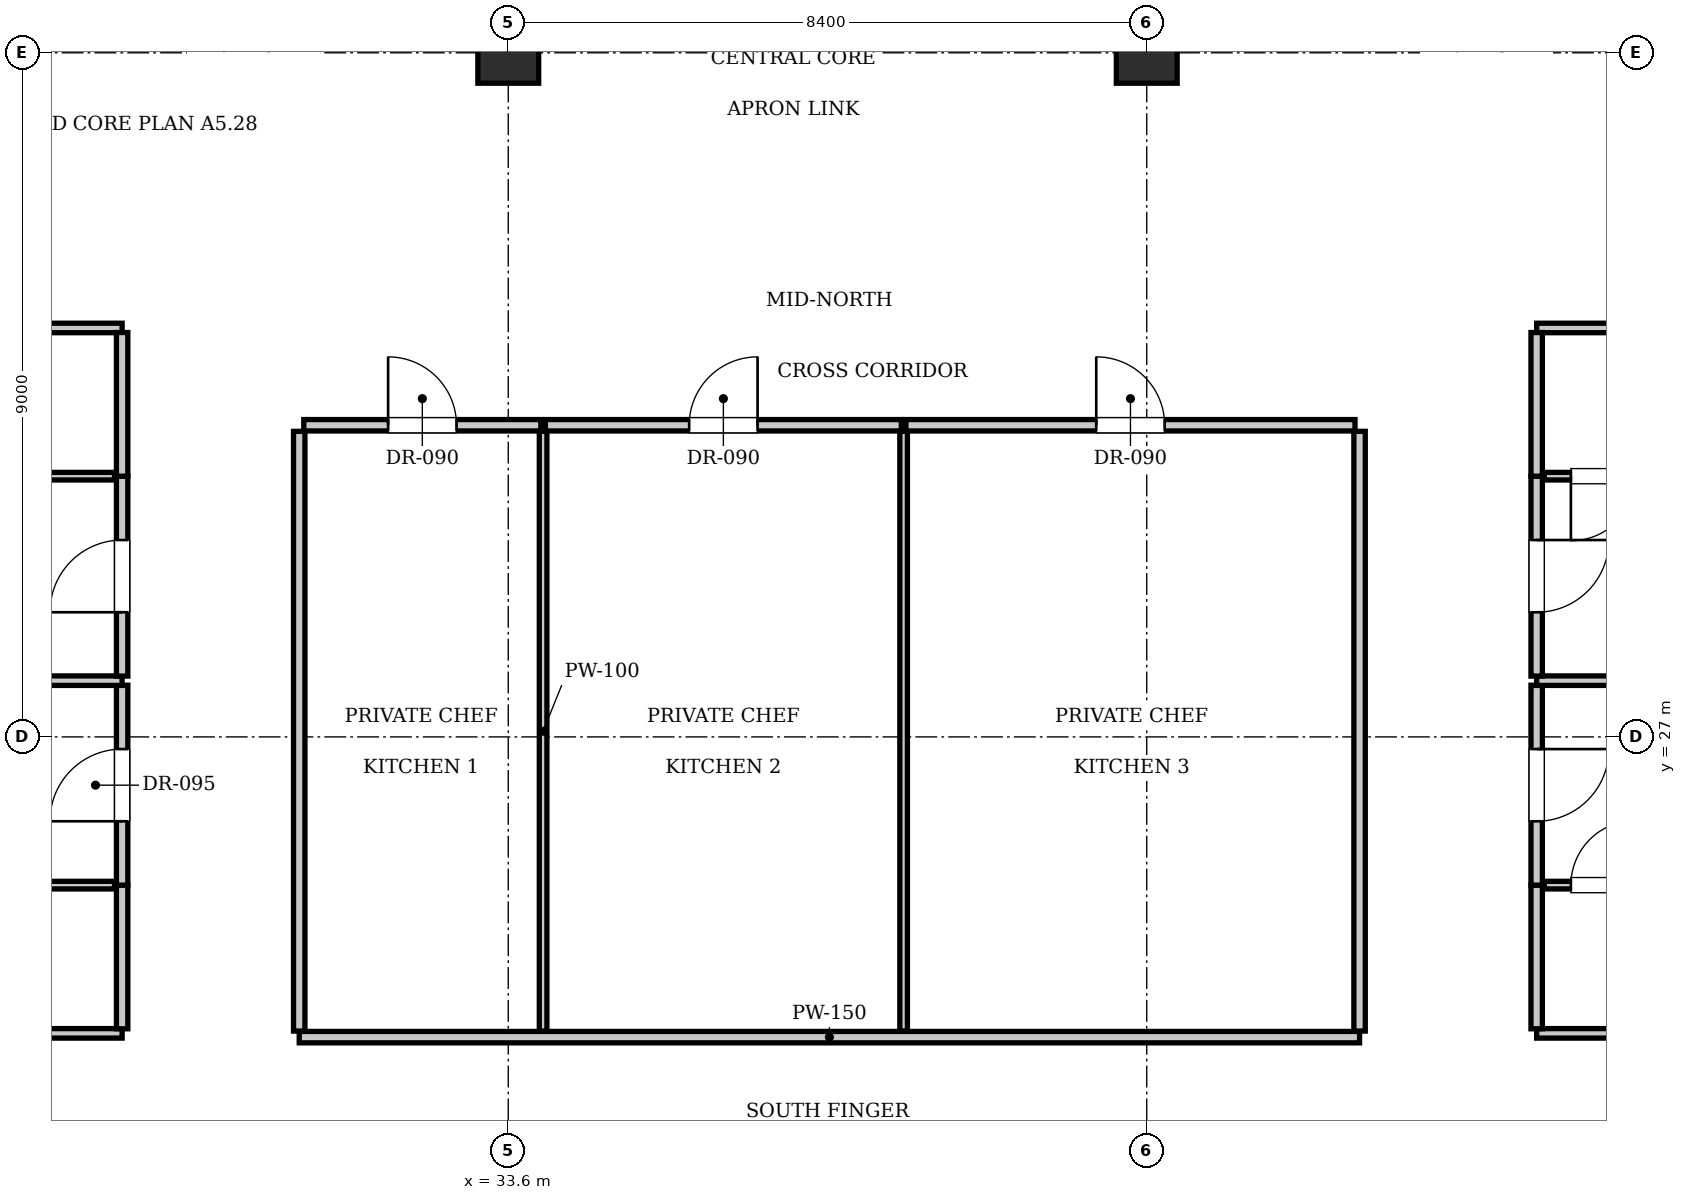
"""IFC4 building model, lengths in metres.
Left out: names, types, materials, properties, quantities, classifications, styles, units other than length and angle.
Written with IfcOpenShell. Run it as: python <this file> out.ifc"""

import sys

from ifc_helpers import new_model, si_unit, direction, frame, frame_2d, origin, origin_2d, place, context, subcontext, project, spatial, rectangle, extrude, element, fill, save


model = new_model("IFC4")
c1 = context("Model", 3, precision=1e-05, world=origin(), true_north=direction((0.0, 1.0)))
c2 = subcontext(c1, "Body", "Model", "MODEL_VIEW")
j1 = project(units=[si_unit("LENGTHUNIT", "METRE"), si_unit("PLANEANGLEUNIT", "RADIAN")], contexts=[c1])
p1 = place(None, origin())
s1 = spatial("IfcSite", under=j1, at=p1, CompositionType="ELEMENT")
p2 = place(p1, origin())
s2 = spatial("IfcBuilding", under=s1, at=p2, CompositionType="ELEMENT")
p3 = place(p2, frame((0.0, 0.0, 281.75)))
s3 = spatial("IfcBuildingStorey", under=s2, at=p3, CompositionType="ELEMENT", Elevation=281.75)
for number, where, z_axis, x_axis in (
    (1, (33.6, 36.0, 0.0), (0.0, 0.0, 1.0), (1.0, 0.0, 0.0)),
    (2, (42.0, 36.0, 0.0), (0.0, 0.0, 1.0), (1.0, 0.0, 0.0)),
):
    element("IfcColumn", number, at=place(p3, frame(where, z_axis=z_axis, x_axis=x_axis)), inside=s3, PredefinedType="COLUMN", context=c2, shape_type="SweptSolid", body=[
        extrude(rectangle(XDim=0.8, YDim=0.8, at=origin_2d()), origin(), (0.0, 0.0, 1.0), 3.85),
    ])
p4 = place(p3, frame((30.85, 23.05, 0.0), z_axis=(0.0, 0.0, 1.0), x_axis=(1.0, 0.0, 0.0)))
e3 = element("IfcWall", 3, at=p4, inside=s3, PredefinedType="PARTITIONING", context=c2, shape_type="SweptSolid", body=[
    extrude(rectangle(XDim=13.95, YDim=0.15, at=frame_2d((6.975, 0.0))), origin(), (0.0, 0.0, 1.0), 3.61),
])
for number, where, z_axis, x_axis in (
    (4, (30.85, 23.13, 0.0), (0.0, 0.0, 1.0), (0.0, 1.0, 0.0)),
    (5, (44.8, 23.13, 0.0), (0.0, 0.0, 1.0), (0.0, 1.0, 0.0)),
):
    element("IfcWall", number, at=place(p3, frame(where, z_axis=z_axis, x_axis=x_axis)), inside=s3, PredefinedType="PARTITIONING", context=c2, shape_type="SweptSolid", body=[
        extrude(rectangle(XDim=7.89, YDim=0.15, at=frame_2d((3.945, 0.0))), origin(), (0.0, 0.0, 1.0), 3.61),
    ])
p5 = place(p3, frame((30.91, 31.1, 0.0), z_axis=(0.0, 0.0, 1.0), x_axis=(1.0, 0.0, 0.0)))
e6 = element("IfcWall", 6, at=p5, inside=s3, PredefinedType="PARTITIONING", context=c2, shape_type="SweptSolid", body=[
    extrude(rectangle(XDim=3.119, YDim=0.15, at=frame_2d((1.559, 0.0))), origin(), (0.0, 0.0, 1.0), 3.61),
])
p6 = place(p5, frame((1.109, 0.0, 0.0)))
e7 = element("IfcOpeningElement", 7, at=p6, cuts=e6, PredefinedType="OPENING", context=c2, shape_type="SweptSolid", body=[
    extrude(rectangle(XDim=0.9, YDim=2.1, at=frame_2d((0.45, 1.05))), frame((0.0, 0.085, 0.0), z_axis=(0.0, -1.0, 0.0), x_axis=(1.0, 0.0, 0.0)), (0.0, 0.0, 1.0), 0.17),
])
p7 = place(p3, frame((34.059, 23.13, 0.0), z_axis=(0.0, 0.0, 1.0), x_axis=(0.0, 1.0, 0.0)))
e8 = element("IfcWall", 8, at=p7, inside=s3, PredefinedType="PARTITIONING", context=c2, shape_type="SweptSolid", body=[
    extrude(rectangle(XDim=7.89, YDim=0.1, at=frame_2d((3.945, 0.0))), origin(), (0.0, 0.0, 1.0), 3.61),
])
p8 = place(p3, frame((34.088, 31.1, 0.0), z_axis=(0.0, 0.0, 1.0), x_axis=(1.0, 0.0, 0.0)))
e9 = element("IfcWall", 9, at=p8, inside=s3, PredefinedType="PARTITIONING", context=c2, shape_type="SweptSolid", body=[
    extrude(rectangle(XDim=4.683, YDim=0.15, at=frame_2d((2.342, 0.0))), origin(), (0.0, 0.0, 1.0), 3.61),
])
p9 = place(p8, frame((1.892, 0.0, 0.0)))
e10 = element("IfcOpeningElement", 10, at=p9, cuts=e9, PredefinedType="OPENING", context=c2, shape_type="SweptSolid", body=[
    extrude(rectangle(XDim=0.9, YDim=2.1, at=frame_2d((0.45, 1.05))), frame((0.0, 0.085, 0.0), z_axis=(0.0, -1.0, 0.0), x_axis=(1.0, 0.0, 0.0)), (0.0, 0.0, 1.0), 0.17),
])
p10 = place(p3, frame((38.802, 23.13, 0.0), z_axis=(0.0, 0.0, 1.0), x_axis=(0.0, 1.0, 0.0)))
e11 = element("IfcWall", 11, at=p10, inside=s3, PredefinedType="PARTITIONING", context=c2, shape_type="SweptSolid", body=[
    extrude(rectangle(XDim=7.89, YDim=0.1, at=frame_2d((3.945, 0.0))), origin(), (0.0, 0.0, 1.0), 3.61),
])
p11 = place(p3, frame((38.832, 31.1, 0.0), z_axis=(0.0, 0.0, 1.0), x_axis=(1.0, 0.0, 0.0)))
e12 = element("IfcWall", 12, at=p11, inside=s3, PredefinedType="PARTITIONING", context=c2, shape_type="SweptSolid", body=[
    extrude(rectangle(XDim=5.908, YDim=0.15, at=frame_2d((2.954, 0.0))), origin(), (0.0, 0.0, 1.0), 3.61),
])
p12 = place(p11, frame((2.504, 0.0, 0.0)))
e13 = element("IfcOpeningElement", 13, at=p12, cuts=e12, PredefinedType="OPENING", context=c2, shape_type="SweptSolid", body=[
    extrude(rectangle(XDim=0.9, YDim=2.1, at=frame_2d((0.45, 1.05))), frame((0.0, 0.085, 0.0), z_axis=(0.0, -1.0, 0.0), x_axis=(1.0, 0.0, 0.0)), (0.0, 0.0, 1.0), 0.17),
])
p13 = place(p3, frame((15.5, 23.1, 0.0), z_axis=(0.0, 0.0, 1.0), x_axis=(1.0, 0.0, 0.0)))
e14 = element("IfcWall", 14, at=p13, inside=s3, PredefinedType="PARTITIONING", context=c2, shape_type="SweptSolid", body=[
    extrude(rectangle(XDim=13.02, YDim=0.125, at=frame_2d((6.51, 0.0))), origin(), (0.0, 0.0, 1.0), 3.61),
])
p14 = place(p3, frame((47.13, 23.1, 0.0), z_axis=(0.0, 0.0, 1.0), x_axis=(1.0, 0.0, 0.0)))
e15 = element("IfcWall", 15, at=p14, inside=s3, PredefinedType="PARTITIONING", context=c2, shape_type="SweptSolid", body=[
    extrude(rectangle(XDim=12.97, YDim=0.125, at=frame_2d((6.485, 0.0))), origin(), (0.0, 0.0, 1.0), 3.61),
])
p15 = place(p3, frame((15.5, 32.38, 0.0), z_axis=(0.0, 0.0, 1.0), x_axis=(1.0, 0.0, 0.0)))
e16 = element("IfcWall", 16, at=p15, inside=s3, PredefinedType="PARTITIONING", context=c2, shape_type="SweptSolid", body=[
    extrude(rectangle(XDim=13.02, YDim=0.125, at=frame_2d((6.51, 0.0))), origin(), (0.0, 0.0, 1.0), 3.61),
])
p16 = place(p3, frame((47.13, 32.38, 0.0), z_axis=(0.0, 0.0, 1.0), x_axis=(1.0, 0.0, 0.0)))
e17 = element("IfcWall", 17, at=p16, inside=s3, PredefinedType="PARTITIONING", context=c2, shape_type="SweptSolid", body=[
    extrude(rectangle(XDim=12.97, YDim=0.125, at=frame_2d((6.485, 0.0))), origin(), (0.0, 0.0, 1.0), 3.61),
])
p17 = place(p3, frame((28.52, 23.16, 0.0), z_axis=(0.0, 0.0, 1.0), x_axis=(0.0, 1.0, 0.0)))
e18 = element("IfcWall", 18, at=p17, inside=s3, PredefinedType="PARTITIONING", context=c2, shape_type="SweptSolid", body=[
    extrude(rectangle(XDim=1.89, YDim=0.15, at=frame_2d((0.945, 0.0))), origin(), (0.0, 0.0, 1.0), 3.61),
])
p18 = place(p3, frame((28.52, 25.05, 0.0), z_axis=(0.0, 0.0, 1.0), x_axis=(0.0, 1.0, 0.0)))
e19 = element("IfcWall", 19, at=p18, inside=s3, PredefinedType="PARTITIONING", context=c2, shape_type="SweptSolid", body=[
    extrude(rectangle(XDim=2.63, YDim=0.15, at=frame_2d((1.315, 0.0))), origin(), (0.0, 0.0, 1.0), 3.61),
])
p19 = place(p18, frame((0.84, 0.0, 0.0)))
e20 = element("IfcOpeningElement", 20, at=p19, cuts=e19, PredefinedType="OPENING", context=c2, shape_type="SweptSolid", body=[
    extrude(rectangle(XDim=0.95, YDim=2.15, at=frame_2d((0.475, 1.075))), frame((0.0, 0.085, 0.0), z_axis=(0.0, -1.0, 0.0), x_axis=(1.0, 0.0, 0.0)), (0.0, 0.0, 1.0), 0.17),
])
p20 = place(p3, frame((26.12, 25.05, 0.0), z_axis=(0.0, 0.0, 1.0), x_axis=(1.0, 0.0, 0.0)))
e21 = element("IfcWall", 21, at=p20, inside=s3, PredefinedType="PARTITIONING", context=c2, shape_type="SweptSolid", body=[
    extrude(rectangle(XDim=2.3, YDim=0.1, at=frame_2d((1.15, 0.0))), origin(), (0.0, 0.0, 1.0), 3.61),
])
p21 = place(p20, frame((0.35, 0.0, 0.0)))
e22 = element("IfcOpeningElement", 22, at=p21, cuts=e21, PredefinedType="OPENING", context=c2, shape_type="SweptSolid", body=[
    extrude(rectangle(XDim=0.85, YDim=2.1, at=frame_2d((0.425, 1.05))), frame((0.0, 0.06, 0.0), z_axis=(0.0, -1.0, 0.0), x_axis=(1.0, 0.0, 0.0)), (0.0, 0.0, 1.0), 0.12),
])
p22 = place(p3, frame((47.13, 23.16, 0.0), z_axis=(0.0, 0.0, 1.0), x_axis=(0.0, 1.0, 0.0)))
e23 = element("IfcWall", 23, at=p22, inside=s3, PredefinedType="PARTITIONING", context=c2, shape_type="SweptSolid", body=[
    extrude(rectangle(XDim=1.89, YDim=0.15, at=frame_2d((0.945, 0.0))), origin(), (0.0, 0.0, 1.0), 3.61),
])
p23 = place(p3, frame((47.13, 25.05, 0.0), z_axis=(0.0, 0.0, 1.0), x_axis=(0.0, 1.0, 0.0)))
e24 = element("IfcWall", 24, at=p23, inside=s3, PredefinedType="PARTITIONING", context=c2, shape_type="SweptSolid", body=[
    extrude(rectangle(XDim=2.63, YDim=0.15, at=frame_2d((1.315, 0.0))), origin(), (0.0, 0.0, 1.0), 3.61),
])
p24 = place(p23, frame((0.84, 0.0, 0.0)))
e25 = element("IfcOpeningElement", 25, at=p24, cuts=e24, PredefinedType="OPENING", context=c2, shape_type="SweptSolid", body=[
    extrude(rectangle(XDim=0.95, YDim=2.15, at=frame_2d((0.475, 1.075))), frame((0.0, 0.085, 0.0), z_axis=(0.0, -1.0, 0.0), x_axis=(1.0, 0.0, 0.0)), (0.0, 0.0, 1.0), 0.17),
])
p25 = place(p3, frame((47.23, 25.05, 0.0), z_axis=(0.0, 0.0, 1.0), x_axis=(1.0, 0.0, 0.0)))
e26 = element("IfcWall", 26, at=p25, inside=s3, PredefinedType="PARTITIONING", context=c2, shape_type="SweptSolid", body=[
    extrude(rectangle(XDim=2.3, YDim=0.1, at=frame_2d((1.15, 0.0))), origin(), (0.0, 0.0, 1.0), 3.61),
])
p26 = place(p25, frame((0.35, 0.0, 0.0)))
e27 = element("IfcOpeningElement", 27, at=p26, cuts=e26, PredefinedType="OPENING", context=c2, shape_type="SweptSolid", body=[
    extrude(rectangle(XDim=0.85, YDim=2.1, at=frame_2d((0.425, 1.05))), frame((0.0, 0.06, 0.0), z_axis=(0.0, -1.0, 0.0), x_axis=(1.0, 0.0, 0.0)), (0.0, 0.0, 1.0), 0.12),
])
p27 = place(p3, frame((15.5, 27.74, 0.0), z_axis=(0.0, 0.0, 1.0), x_axis=(1.0, 0.0, 0.0)))
e28 = element("IfcWall", 28, at=p27, inside=s3, PredefinedType="PARTITIONING", context=c2, shape_type="SweptSolid", body=[
    extrude(rectangle(XDim=13.02, YDim=0.125, at=frame_2d((6.51, 0.0))), origin(), (0.0, 0.0, 1.0), 3.61),
])
p28 = place(p3, frame((47.13, 27.74, 0.0), z_axis=(0.0, 0.0, 1.0), x_axis=(1.0, 0.0, 0.0)))
e29 = element("IfcWall", 29, at=p28, inside=s3, PredefinedType="PARTITIONING", context=c2, shape_type="SweptSolid", body=[
    extrude(rectangle(XDim=12.97, YDim=0.125, at=frame_2d((6.485, 0.0))), origin(), (0.0, 0.0, 1.0), 3.61),
])
p29 = place(p3, frame((28.52, 27.8, 0.0), z_axis=(0.0, 0.0, 1.0), x_axis=(0.0, 1.0, 0.0)))
e30 = element("IfcWall", 30, at=p29, inside=s3, PredefinedType="PARTITIONING", context=c2, shape_type="SweptSolid", body=[
    extrude(rectangle(XDim=2.63, YDim=0.15, at=frame_2d((1.315, 0.0))), origin(), (0.0, 0.0, 1.0), 3.61),
])
p30 = place(p29, frame((0.84, 0.0, 0.0)))
e31 = element("IfcOpeningElement", 31, at=p30, cuts=e30, PredefinedType="OPENING", context=c2, shape_type="SweptSolid", body=[
    extrude(rectangle(XDim=0.95, YDim=2.15, at=frame_2d((0.475, 1.075))), frame((0.0, 0.085, 0.0), z_axis=(0.0, -1.0, 0.0), x_axis=(1.0, 0.0, 0.0)), (0.0, 0.0, 1.0), 0.17),
])
p31 = place(p3, frame((28.52, 30.43, 0.0), z_axis=(0.0, 0.0, 1.0), x_axis=(0.0, 1.0, 0.0)))
e32 = element("IfcWall", 32, at=p31, inside=s3, PredefinedType="PARTITIONING", context=c2, shape_type="SweptSolid", body=[
    extrude(rectangle(XDim=1.89, YDim=0.15, at=frame_2d((0.945, 0.0))), origin(), (0.0, 0.0, 1.0), 3.61),
])
p32 = place(p3, frame((26.12, 30.43, 0.0), z_axis=(0.0, 0.0, 1.0), x_axis=(1.0, 0.0, 0.0)))
e33 = element("IfcWall", 33, at=p32, inside=s3, PredefinedType="PARTITIONING", context=c2, shape_type="SweptSolid", body=[
    extrude(rectangle(XDim=2.3, YDim=0.1, at=frame_2d((1.15, 0.0))), origin(), (0.0, 0.0, 1.0), 3.61),
])
p33 = place(p32, frame((0.35, 0.0, 0.0)))
e34 = element("IfcOpeningElement", 34, at=p33, cuts=e33, PredefinedType="OPENING", context=c2, shape_type="SweptSolid", body=[
    extrude(rectangle(XDim=0.85, YDim=2.1, at=frame_2d((0.425, 1.05))), frame((0.0, 0.06, 0.0), z_axis=(0.0, -1.0, 0.0), x_axis=(1.0, 0.0, 0.0)), (0.0, 0.0, 1.0), 0.12),
])
p34 = place(p3, frame((47.13, 27.8, 0.0), z_axis=(0.0, 0.0, 1.0), x_axis=(0.0, 1.0, 0.0)))
e35 = element("IfcWall", 35, at=p34, inside=s3, PredefinedType="PARTITIONING", context=c2, shape_type="SweptSolid", body=[
    extrude(rectangle(XDim=2.63, YDim=0.15, at=frame_2d((1.315, 0.0))), origin(), (0.0, 0.0, 1.0), 3.61),
])
p35 = place(p34, frame((0.84, 0.0, 0.0)))
e36 = element("IfcOpeningElement", 36, at=p35, cuts=e35, PredefinedType="OPENING", context=c2, shape_type="SweptSolid", body=[
    extrude(rectangle(XDim=0.95, YDim=2.15, at=frame_2d((0.475, 1.075))), frame((0.0, 0.085, 0.0), z_axis=(0.0, -1.0, 0.0), x_axis=(1.0, 0.0, 0.0)), (0.0, 0.0, 1.0), 0.17),
])
p36 = place(p3, frame((47.13, 30.43, 0.0), z_axis=(0.0, 0.0, 1.0), x_axis=(0.0, 1.0, 0.0)))
e37 = element("IfcWall", 37, at=p36, inside=s3, PredefinedType="PARTITIONING", context=c2, shape_type="SweptSolid", body=[
    extrude(rectangle(XDim=1.89, YDim=0.15, at=frame_2d((0.945, 0.0))), origin(), (0.0, 0.0, 1.0), 3.61),
])
p37 = place(p3, frame((47.23, 30.43, 0.0), z_axis=(0.0, 0.0, 1.0), x_axis=(1.0, 0.0, 0.0)))
e38 = element("IfcWall", 38, at=p37, inside=s3, PredefinedType="PARTITIONING", context=c2, shape_type="SweptSolid", body=[
    extrude(rectangle(XDim=2.3, YDim=0.1, at=frame_2d((1.15, 0.0))), origin(), (0.0, 0.0, 1.0), 3.61),
])
p38 = place(p37, frame((0.35, 0.0, 0.0)))
e39 = element("IfcOpeningElement", 39, at=p38, cuts=e38, PredefinedType="OPENING", context=c2, shape_type="SweptSolid", body=[
    extrude(rectangle(XDim=0.85, YDim=2.1, at=frame_2d((0.425, 1.05))), frame((0.0, 0.06, 0.0), z_axis=(0.0, -1.0, 0.0), x_axis=(1.0, 0.0, 0.0)), (0.0, 0.0, 1.0), 0.12),
])
p39 = place(p6, origin())
e40 = element("IfcDoor", 40, at=p39, inside=s3, OperationType="SINGLE_SWING_LEFT", PredefinedType="DOOR", context=c2, shape_type="SweptSolid", body=[
    extrude(rectangle(XDim=0.9, YDim=2.1, at=frame_2d((0.45, 1.05))), frame((0.0, 0.025, 0.0), z_axis=(0.0, -1.0, 0.0), x_axis=(1.0, 0.0, 0.0)), (0.0, 0.0, 1.0), 0.05),
])
fill(e7, e40)
p40 = place(p9, origin())
e41 = element("IfcDoor", 41, at=p40, inside=s3, OperationType="SINGLE_SWING_RIGHT", PredefinedType="DOOR", context=c2, shape_type="SweptSolid", body=[
    extrude(rectangle(XDim=0.9, YDim=2.1, at=frame_2d((0.45, 1.05))), frame((0.0, 0.025, 0.0), z_axis=(0.0, -1.0, 0.0), x_axis=(1.0, 0.0, 0.0)), (0.0, 0.0, 1.0), 0.05),
])
fill(e10, e41)
p41 = place(p12, origin())
e42 = element("IfcDoor", 42, at=p41, inside=s3, OperationType="SINGLE_SWING_LEFT", PredefinedType="DOOR", context=c2, shape_type="SweptSolid", body=[
    extrude(rectangle(XDim=0.9, YDim=2.1, at=frame_2d((0.45, 1.05))), frame((0.0, 0.025, 0.0), z_axis=(0.0, -1.0, 0.0), x_axis=(1.0, 0.0, 0.0)), (0.0, 0.0, 1.0), 0.05),
])
fill(e13, e42)
p42 = place(p19, origin())
e43 = element("IfcDoor", 43, at=p42, inside=s3, OperationType="SINGLE_SWING_LEFT", PredefinedType="DOOR", context=c2, shape_type="SweptSolid", body=[
    extrude(rectangle(XDim=0.95, YDim=2.15, at=frame_2d((0.475, 1.075))), frame((0.0, 0.025, 0.0), z_axis=(0.0, -1.0, 0.0), x_axis=(1.0, 0.0, 0.0)), (0.0, 0.0, 1.0), 0.05),
])
fill(e20, e43)
p43 = place(p26, origin())
e44 = element("IfcDoor", 44, at=p43, inside=s3, OperationType="SINGLE_SWING_RIGHT", PredefinedType="DOOR", context=c2, shape_type="SweptSolid", body=[
    extrude(rectangle(XDim=0.85, YDim=2.1, at=frame_2d((0.425, 1.05))), frame((0.0, 0.025, 0.0), z_axis=(0.0, -1.0, 0.0), x_axis=(1.0, 0.0, 0.0)), (0.0, 0.0, 1.0), 0.05),
])
fill(e27, e44)
p44 = place(p24, frame((0.95, 0.0, 0.0), z_axis=(0.0, 0.0, 1.0), x_axis=(-1.0, 0.0, 0.0)))
e45 = element("IfcDoor", 45, at=p44, inside=s3, OperationType="SINGLE_SWING_LEFT", PredefinedType="DOOR", context=c2, shape_type="SweptSolid", body=[
    extrude(rectangle(XDim=0.95, YDim=2.15, at=frame_2d((0.475, 1.075))), frame((0.0, 0.025, 0.0), z_axis=(0.0, -1.0, 0.0), x_axis=(1.0, 0.0, 0.0)), (0.0, 0.0, 1.0), 0.05),
])
fill(e25, e45)
p45 = place(p30, origin())
e46 = element("IfcDoor", 46, at=p45, inside=s3, OperationType="SINGLE_SWING_LEFT", PredefinedType="DOOR", context=c2, shape_type="SweptSolid", body=[
    extrude(rectangle(XDim=0.95, YDim=2.15, at=frame_2d((0.475, 1.075))), frame((0.0, 0.025, 0.0), z_axis=(0.0, -1.0, 0.0), x_axis=(1.0, 0.0, 0.0)), (0.0, 0.0, 1.0), 0.05),
])
fill(e31, e46)
p46 = place(p38, frame((0.85, 0.0, 0.0), z_axis=(0.0, 0.0, 1.0), x_axis=(-1.0, 0.0, 0.0)))
e47 = element("IfcDoor", 47, at=p46, inside=s3, OperationType="SINGLE_SWING_RIGHT", PredefinedType="DOOR", context=c2, shape_type="SweptSolid", body=[
    extrude(rectangle(XDim=0.85, YDim=2.1, at=frame_2d((0.425, 1.05))), frame((0.0, 0.025, 0.0), z_axis=(0.0, -1.0, 0.0), x_axis=(1.0, 0.0, 0.0)), (0.0, 0.0, 1.0), 0.05),
])
fill(e39, e47)
p47 = place(p35, frame((0.95, 0.0, 0.0), z_axis=(0.0, 0.0, 1.0), x_axis=(-1.0, 0.0, 0.0)))
e48 = element("IfcDoor", 48, at=p47, inside=s3, OperationType="SINGLE_SWING_LEFT", PredefinedType="DOOR", context=c2, shape_type="SweptSolid", body=[
    extrude(rectangle(XDim=0.95, YDim=2.15, at=frame_2d((0.475, 1.075))), frame((0.0, 0.025, 0.0), z_axis=(0.0, -1.0, 0.0), x_axis=(1.0, 0.0, 0.0)), (0.0, 0.0, 1.0), 0.05),
])
fill(e36, e48)
save(model, sys.argv[1])
